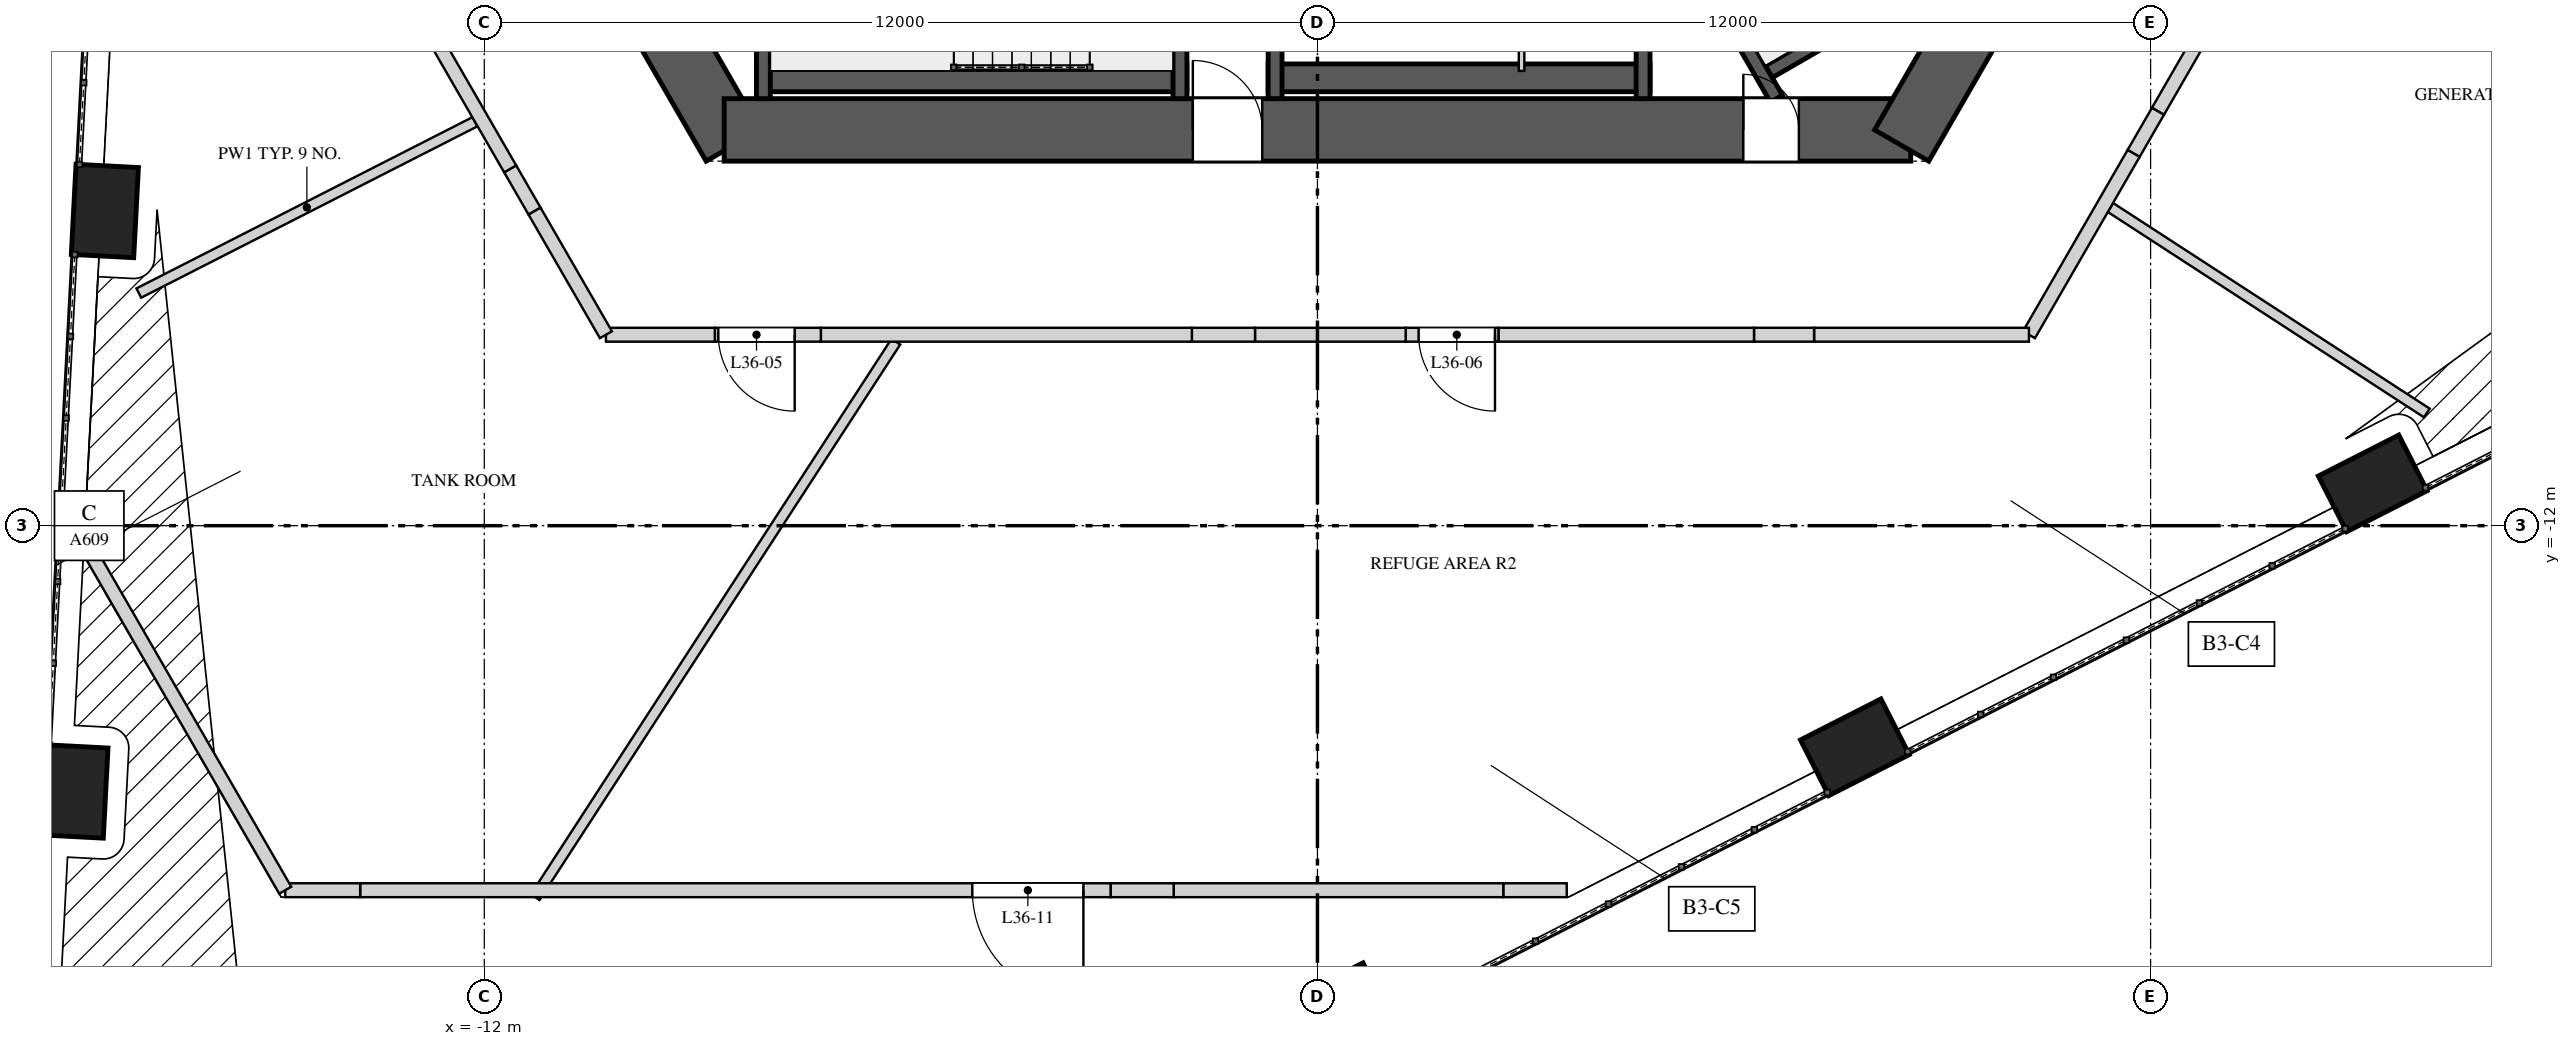
"""IFC4 building model, lengths in metres.
Left out: names, types, materials, properties, quantities, classifications, styles, units other than length and angle.
Written with IfcOpenShell. Run it as: python <this file> out.ifc"""

import sys

from ifc_helpers import new_model, si_unit, direction, frame, frame_2d, origin, origin_2d, place, context, subcontext, project, spatial, polyline, rectangle, outline, extrude, element, fill, save


model = new_model("IFC4")
c1 = context("Model", 3, precision=1e-05, world=origin(), true_north=direction((0.0, 1.0)))
c2 = subcontext(c1, "Body", "Model", "MODEL_VIEW")
j1 = project(units=[si_unit("LENGTHUNIT", "METRE"), si_unit("PLANEANGLEUNIT", "RADIAN")], contexts=[c1])
p1 = place(None, origin())
s1 = spatial("IfcSite", under=j1, at=p1, CompositionType="ELEMENT")
p2 = place(p1, origin())
s2 = spatial("IfcBuilding", under=s1, at=p2, CompositionType="ELEMENT")
p3 = place(p2, frame((0.0, 0.0, 157.6)))
s3 = spatial("IfcBuildingStorey", under=s2, at=p3, CompositionType="ELEMENT", Elevation=157.6)
p4 = place(p3, frame((-9.858, -4.025, 0.0), z_axis=(0.0, 0.0, 1.0), x_axis=(0.500059191753, -0.865991226713, 0.0)))
e1 = element("IfcWall", 1, at=p4, inside=s3, PredefinedType="SHEAR", context=c2, shape_type="SweptSolid", body=[
    extrude(rectangle(XDim=2.887, YDim=0.9, at=frame_2d((1.443, 0.0))), origin(), (0.0, 0.0, 1.0), 5.2),
])
p5 = place(p3, frame((-8.545, -6.3, 0.0), z_axis=(0.0, 0.0, 1.0), x_axis=(1.0, 0.0, 0.0)))
e2 = element("IfcWall", 2, at=p5, inside=s3, PredefinedType="SHEAR", context=c2, shape_type="SweptSolid", body=[
    extrude(rectangle(XDim=17.09, YDim=0.9, at=frame_2d((8.545, 0.0))), origin(), (0.0, 0.0, 1.0), 5.2),
])
p6 = place(p5, frame((6.75, 0.0, 0.0)))
e3 = element("IfcOpeningElement", 3, at=p6, cuts=e2, PredefinedType="OPENING", context=c2, shape_type="SweptSolid", body=[
    extrude(rectangle(XDim=1.0, YDim=2.4, at=frame_2d((0.5, 1.2))), frame((0.0, 0.46, 0.0), z_axis=(0.0, -1.0, 0.0), x_axis=(1.0, 0.0, 0.0)), (0.0, 0.0, 1.0), 0.92),
])
p7 = place(p5, frame((14.678, 0.0, 0.0)))
e4 = element("IfcOpeningElement", 4, at=p7, cuts=e2, PredefinedType="OPENING", context=c2, shape_type="SweptSolid", body=[
    extrude(rectangle(XDim=0.8, YDim=2.1, at=frame_2d((0.4, 1.05))), frame((0.0, 0.46, 0.0), z_axis=(0.0, -1.0, 0.0), x_axis=(1.0, 0.0, 0.0)), (0.0, 0.0, 1.0), 0.92),
])
p8 = place(p3, frame((8.415, -6.525, 0.0), z_axis=(0.0, 0.0, 1.0), x_axis=(0.500059191753, 0.865991226713, 0.0)))
e5 = element("IfcWall", 5, at=p8, inside=s3, PredefinedType="SHEAR", context=c2, shape_type="SweptSolid", body=[
    extrude(rectangle(XDim=2.887, YDim=0.9, at=frame_2d((1.443, 0.0))), origin(), (0.0, 0.0, 1.0), 5.2),
])
for number, where, z_axis, x_axis in (
    (6, (-17.465, -7.468, 0.0), (0.0, 0.0, 1.0), (-0.052, -0.999, 0.0)),
    (7, (-17.903, -15.828, 0.0), (0.0, 0.0, 1.0), (-0.052, -0.999, 0.0)),
    (8, (0.281, -18.992, 0.0), (0.0, 0.0, 1.0), (0.891, 0.454, 0.0)),
    (9, (7.74, -15.192, 0.0), (0.0, 0.0, 1.0), (0.891, 0.454, 0.0)),
    (10, (15.2, -11.391, 0.0), (0.0, 0.0, 1.0), (0.891, 0.454, 0.0)),
):
    element("IfcColumn", number, at=place(p3, frame(where, z_axis=z_axis, x_axis=x_axis)), inside=s3, PredefinedType="COLUMN", context=c2, shape_type="SweptSolid", body=[
        extrude(rectangle(XDim=1.3, YDim=0.9, at=origin_2d()), origin(), (0.0, 0.0, 1.0), 2.835),
    ])
p9 = place(p3, frame((-8.08, -5.55, 0.0), z_axis=(0.0, 0.0, 1.0), x_axis=(1.0, 0.0, 0.0)))
e11 = element("IfcWall", 11, at=p9, inside=s3, PredefinedType="SOLIDWALL", context=c2, shape_type="SweptSolid", body=[
    extrude(rectangle(XDim=6.2, YDim=0.4, at=frame_2d((3.1, 0.0))), origin(), (0.0, 0.0, 1.0), 4.85),
])
p10 = place(p3, frame((-7.98, -2.9, 0.0), z_axis=(0.0, 0.0, 1.0), x_axis=(0.0, -1.0, 0.0)))
e12 = element("IfcWall", 12, at=p10, inside=s3, PredefinedType="SOLIDWALL", context=c2, shape_type="SweptSolid", body=[
    extrude(rectangle(XDim=2.95, YDim=0.2, at=frame_2d((1.475, 0.0))), origin(), (0.0, 0.0, 1.0), 4.85),
])
p11 = place(p3, frame((-1.98, -2.9, 0.0), z_axis=(0.0, 0.0, 1.0), x_axis=(0.0, -1.0, 0.0)))
e13 = element("IfcWall", 13, at=p11, inside=s3, PredefinedType="SOLIDWALL", context=c2, shape_type="SweptSolid", body=[
    extrude(rectangle(XDim=2.95, YDim=0.2, at=frame_2d((1.475, 0.0))), origin(), (0.0, 0.0, 1.0), 4.85),
])
p12 = place(p11, frame((0.725, 0.0, 0.0)))
e14 = element("IfcOpeningElement", 14, at=p12, cuts=e13, PredefinedType="OPENING", context=c2, shape_type="SweptSolid", body=[
    extrude(rectangle(XDim=1.1, YDim=2.4, at=frame_2d((0.55, 1.2))), frame((0.0, 0.11, 0.0), z_axis=(0.0, -1.0, 0.0), x_axis=(1.0, 0.0, 0.0)), (0.0, 0.0, 1.0), 0.22),
])
p13 = place(p3, frame((6.611, -5.85, 0.0), z_axis=(0.0, 0.0, 1.0), x_axis=(-0.499965531574, 0.866045303225, 0.0)))
e15 = element("IfcWall", 15, at=p13, inside=s3, PredefinedType="SOLIDWALL", context=c2, shape_type="SweptSolid", body=[
    extrude(rectangle(XDim=6.492, YDim=0.2, at=frame_2d((3.246, 0.0))), origin(), (0.0, 0.0, 1.0), 4.85),
])
p14 = place(p3, frame((6.501, -5.461, 0.0), z_axis=(0.0, 0.0, 1.0), x_axis=(0.866003658127, 0.500037662692, 0.0)))
e16 = element("IfcWall", 16, at=p14, inside=s3, PredefinedType="SOLIDWALL", context=c2, shape_type="SweptSolid", body=[
    extrude(rectangle(XDim=2.95, YDim=0.2, at=frame_2d((1.475, 0.0))), origin(), (0.0, 0.0, 1.0), 4.85),
])
p15 = place(p3, frame((-0.71, -5.55, 0.0), z_axis=(0.0, 0.0, 1.0), x_axis=(1.0, 0.0, 0.0)))
e17 = element("IfcWall", 17, at=p15, inside=s3, PredefinedType="SOLIDWALL", context=c2, shape_type="SweptSolid", body=[
    extrude(rectangle(XDim=5.5, YDim=0.4, at=frame_2d((2.75, 0.0))), origin(), (0.0, 0.0, 1.0), 4.85),
])
for number, where, z_axis, x_axis in (
    (18, (-0.61, -3.1, 0.0), (0.0, 0.0, 1.0), (0.0, -1.0, 0.0)),
    (19, (4.69, -3.1, 0.0), (0.0, 0.0, 1.0), (0.0, -1.0, 0.0)),
):
    element("IfcWall", number, at=place(p3, frame(where, z_axis=z_axis, x_axis=x_axis)), inside=s3, PredefinedType="SOLIDWALL", context=c2, shape_type="SweptSolid", body=[
        extrude(rectangle(XDim=2.75, YDim=0.2, at=frame_2d((1.375, 0.0))), origin(), (0.0, 0.0, 1.0), 4.85),
    ])
p16 = place(p3, frame((2.94, -3.1, 0.0), z_axis=(0.0, 0.0, 1.0), x_axis=(0.0, -1.0, 0.0)))
e20 = element("IfcWall", 20, at=p16, inside=s3, PredefinedType="PARTITIONING", context=c2, shape_type="SweptSolid", body=[
    extrude(rectangle(XDim=2.35, YDim=0.08, at=frame_2d((1.175, 0.0))), origin(), (0.0, 0.0, 1.0), 4.85),
])
p17 = place(p3, frame((-12.134, -6.183, 0.0), z_axis=(0.0, 0.0, 1.0), x_axis=(-0.891023038557, -0.45395808701, 0.0)))
e21 = element("IfcWall", 21, at=p17, inside=s3, PredefinedType="PARTITIONING", context=c2, shape_type="SweptSolid", body=[
    extrude(rectangle(XDim=5.434, YDim=0.15, at=frame_2d((2.717, 0.0))), origin(), (0.0, 0.0, 1.0), 4.85),
])
p18 = place(p3, frame((-6.072, -9.35, 0.0), z_axis=(0.0, 0.0, 1.0), x_axis=(-0.544642851203, -0.838668089672, 0.0)))
e22 = element("IfcWall", 22, at=p18, inside=s3, PredefinedType="PARTITIONING", context=c2, shape_type="SweptSolid", body=[
    extrude(rectangle(XDim=9.539, YDim=0.15, at=frame_2d((4.77, 0.0))), origin(), (0.0, 0.0, 1.0), 4.85),
])
p19 = place(p3, frame((11.422, -7.417, 0.0), z_axis=(0.0, 0.0, 1.0), x_axis=(0.838667328076, -0.544644023944, 0.0)))
e23 = element("IfcWall", 23, at=p19, inside=s3, PredefinedType="PARTITIONING", context=c2, shape_type="SweptSolid", body=[
    extrude(rectangle(XDim=5.434, YDim=0.15, at=frame_2d((2.717, 0.0))), origin(), (0.0, 0.0, 1.0), 4.85),
])
p20 = place(p3, frame((13.135, -4.25, 0.0), z_axis=(0.0, 0.0, 1.0), x_axis=(-0.500030520673, -0.866007781949, 0.0)))
e24 = element("IfcWall", 24, at=p20, inside=s3, PredefinedType="SOLIDWALL", context=c2, shape_type="SweptSolid", body=[
    extrude(rectangle(XDim=2.058, YDim=0.2, at=frame_2d((1.029, 0.0))), origin(), (0.0, 0.0, 1.0), 4.85),
])
p21 = place(p3, frame((12.106, -6.032, 0.0), z_axis=(0.0, 0.0, 1.0), x_axis=(-0.49996389635, -0.866046247233, 0.0)))
e25 = element("IfcWall", 25, at=p21, inside=s3, PredefinedType="SOLIDWALL", context=c2, shape_type="SweptSolid", body=[
    extrude(rectangle(XDim=0.7, YDim=0.2, at=frame_2d((0.35, 0.0))), origin(), (0.0, 0.0, 1.0), 4.15),
])
p22 = place(p3, frame((11.756, -6.639, 0.0), z_axis=(0.0, 0.0, 1.0), x_axis=(-0.499979445284, -0.86603727073, 0.0)))
e26 = element("IfcWall", 26, at=p22, inside=s3, PredefinedType="SOLIDWALL", context=c2, shape_type="SweptSolid", body=[
    extrude(rectangle(XDim=3.015, YDim=0.2, at=frame_2d((1.508, 0.0))), origin(), (0.0, 0.0, 1.0), 4.85),
])
p23 = place(p3, frame((10.248, -9.25, 0.0), z_axis=(0.0, 0.0, 1.0), x_axis=(-1.0, 0.0, 0.0)))
e27 = element("IfcWall", 27, at=p23, inside=s3, PredefinedType="SOLIDWALL", context=c2, shape_type="SweptSolid", body=[
    extrude(rectangle(XDim=3.095, YDim=0.2, at=frame_2d((1.547, 0.0))), origin(), (0.0, 0.0, 1.0), 4.85),
])
p24 = place(p3, frame((7.153, -9.25, 0.0), z_axis=(0.0, 0.0, 1.0), x_axis=(-1.0, 0.0, 0.0)))
e28 = element("IfcWall", 28, at=p24, inside=s3, PredefinedType="SOLIDWALL", context=c2, shape_type="SweptSolid", body=[
    extrude(rectangle(XDim=0.865, YDim=0.2, at=frame_2d((0.433, 0.0))), origin(), (0.0, 0.0, 1.0), 4.15),
])
p25 = place(p3, frame((6.288, -9.25, 0.0), z_axis=(0.0, 0.0, 1.0), x_axis=(-1.0, 0.0, 0.0)))
e29 = element("IfcWall", 29, at=p25, inside=s3, PredefinedType="SOLIDWALL", context=c2, shape_type="SweptSolid", body=[
    extrude(rectangle(XDim=3.681, YDim=0.2, at=frame_2d((1.84, 0.0))), origin(), (0.0, 0.0, 1.0), 4.85),
])
p26 = place(p3, frame((2.607, -9.25, 0.0), z_axis=(0.0, 0.0, 1.0), x_axis=(-1.0, 0.0, 0.0)))
e30 = element("IfcWall", 30, at=p26, inside=s3, PredefinedType="SOLIDWALL", context=c2, shape_type="SweptSolid", body=[
    extrude(outline(polyline([(0.0, 0.0), (1.337, 0.0), (1.337, 4.15), (0.626, 4.15), (0.626, 4.85), (0.0, 4.85), (0.0, 0.0)])), frame((0.0, 0.1, 0.0), z_axis=(0.0, -1.0, 0.0), x_axis=(1.0, 0.0, 0.0)), (0.0, 0.0, 1.0), 0.2),
])
p27 = place(p26, frame((0.05, 0.0, 0.0)))
e31 = element("IfcOpeningElement", 31, at=p27, cuts=e30, PredefinedType="OPENING", context=c2, shape_type="SweptSolid", body=[
    extrude(rectangle(XDim=1.1, YDim=2.2, at=frame_2d((0.55, 1.1))), frame((0.0, 0.11, 0.0), z_axis=(0.0, -1.0, 0.0), x_axis=(1.0, 0.0, 0.0)), (0.0, 0.0, 1.0), 0.22),
])
p28 = place(p3, frame((1.271, -9.25, 0.0), z_axis=(0.0, 0.0, 1.0), x_axis=(-1.0, 0.0, 0.0)))
e32 = element("IfcWall", 32, at=p28, inside=s3, PredefinedType="SOLIDWALL", context=c2, shape_type="SweptSolid", body=[
    extrude(rectangle(XDim=2.17, YDim=0.2, at=frame_2d((1.085, 0.0))), origin(), (0.0, 0.0, 1.0), 4.85),
])
p29 = place(p3, frame((-0.899, -9.25, 0.0), z_axis=(0.0, 0.0, 1.0), x_axis=(-1.0, 0.0, 0.0)))
e33 = element("IfcWall", 33, at=p29, inside=s3, PredefinedType="SOLIDWALL", context=c2, shape_type="SweptSolid", body=[
    extrude(rectangle(XDim=0.909, YDim=0.2, at=frame_2d((0.455, 0.0))), origin(), (0.0, 0.0, 1.0), 3.75),
])
p30 = place(p3, frame((-1.809, -9.25, 0.0), z_axis=(0.0, 0.0, 1.0), x_axis=(-1.0, 0.0, 0.0)))
e34 = element("IfcWall", 34, at=p30, inside=s3, PredefinedType="SOLIDWALL", context=c2, shape_type="SweptSolid", body=[
    extrude(rectangle(XDim=5.344, YDim=0.2, at=frame_2d((2.672, 0.0))), origin(), (0.0, 0.0, 1.0), 4.85),
])
p31 = place(p3, frame((-7.152, -9.25, 0.0), z_axis=(0.0, 0.0, 1.0), x_axis=(-1.0, 0.0, 0.0)))
e35 = element("IfcWall", 35, at=p31, inside=s3, PredefinedType="SOLIDWALL", context=c2, shape_type="SweptSolid", body=[
    extrude(outline(polyline([(0.0, 0.0), (1.527, 0.0), (1.527, 4.85), (1.039, 4.85), (1.039, 3.95), (0.0, 3.95), (0.0, 0.0)])), frame((0.0, 0.1, 0.0), z_axis=(0.0, -1.0, 0.0), x_axis=(1.0, 0.0, 0.0)), (0.0, 0.0, 1.0), 0.2),
])
p32 = place(p31, frame((0.377, 0.0, 0.0)))
e36 = element("IfcOpeningElement", 36, at=p32, cuts=e35, PredefinedType="OPENING", context=c2, shape_type="SweptSolid", body=[
    extrude(rectangle(XDim=1.1, YDim=2.2, at=frame_2d((0.55, 1.1))), frame((0.0, 0.11, 0.0), z_axis=(0.0, -1.0, 0.0), x_axis=(1.0, 0.0, 0.0)), (0.0, 0.0, 1.0), 0.22),
])
p33 = place(p3, frame((-8.679, -9.25, 0.0), z_axis=(0.0, 0.0, 1.0), x_axis=(-1.0, 0.0, 0.0)))
e37 = element("IfcWall", 37, at=p33, inside=s3, PredefinedType="SOLIDWALL", context=c2, shape_type="SweptSolid", body=[
    extrude(rectangle(XDim=1.569, YDim=0.2, at=frame_2d((0.784, 0.0))), origin(), (0.0, 0.0, 1.0), 4.85),
])
p34 = place(p3, frame((-10.248, -9.25, 0.0), z_axis=(0.0, 0.0, 1.0), x_axis=(-0.499941542975, 0.866059151333, 0.0)))
e38 = element("IfcWall", 38, at=p34, inside=s3, PredefinedType="SOLIDWALL", context=c2, shape_type="SweptSolid", body=[
    extrude(rectangle(XDim=2.058, YDim=0.2, at=frame_2d((1.029, 0.0))), origin(), (0.0, 0.0, 1.0), 4.85),
])
p35 = place(p3, frame((-11.277, -7.468, 0.0), z_axis=(0.0, 0.0, 1.0), x_axis=(-0.50022532796, 0.865895271535, 0.0)))
e39 = element("IfcWall", 39, at=p35, inside=s3, PredefinedType="SOLIDWALL", context=c2, shape_type="SweptSolid", body=[
    extrude(rectangle(XDim=0.7, YDim=0.2, at=frame_2d((0.35, 0.0))), origin(), (0.0, 0.0, 1.0), 4.15),
])
p36 = place(p3, frame((-11.627, -6.861, 0.0), z_axis=(0.0, 0.0, 1.0), x_axis=(-0.499979445284, 0.86603727073, 0.0)))
e40 = element("IfcWall", 40, at=p36, inside=s3, PredefinedType="SOLIDWALL", context=c2, shape_type="SweptSolid", body=[
    extrude(rectangle(XDim=3.015, YDim=0.2, at=frame_2d((1.508, 0.0))), origin(), (0.0, 0.0, 1.0), 4.85),
])
p37 = place(p3, frame((3.591, -17.25, 0.0), z_axis=(0.0, 0.0, 1.0), x_axis=(-1.0, 0.0, 0.0)))
e41 = element("IfcWall", 41, at=p37, inside=s3, PredefinedType="SOLIDWALL", context=c2, shape_type="SweptSolid", body=[
    extrude(rectangle(XDim=0.914, YDim=0.2, at=frame_2d((0.457, 0.0))), origin(), (0.0, 0.0, 1.0), 4.15),
])
p38 = place(p3, frame((2.677, -17.25, 0.0), z_axis=(0.0, 0.0, 1.0), x_axis=(-1.0, 0.0, 0.0)))
e42 = element("IfcWall", 42, at=p38, inside=s3, PredefinedType="SOLIDWALL", context=c2, shape_type="SweptSolid", body=[
    extrude(rectangle(XDim=4.747, YDim=0.2, at=frame_2d((2.374, 0.0))), origin(), (0.0, 0.0, 1.0), 4.85),
])
p39 = place(p3, frame((-2.07, -17.25, 0.0), z_axis=(0.0, 0.0, 1.0), x_axis=(-1.0, 0.0, 0.0)))
e43 = element("IfcWall", 43, at=p39, inside=s3, PredefinedType="SOLIDWALL", context=c2, shape_type="SweptSolid", body=[
    extrude(rectangle(XDim=0.91, YDim=0.2, at=frame_2d((0.455, 0.0))), origin(), (0.0, 0.0, 1.0), 3.75),
])
p40 = place(p3, frame((-2.98, -17.25, 0.0), z_axis=(0.0, 0.0, 1.0), x_axis=(-1.0, 0.0, 0.0)))
e44 = element("IfcWall", 44, at=p40, inside=s3, PredefinedType="SOLIDWALL", context=c2, shape_type="SweptSolid", body=[
    extrude(rectangle(XDim=10.808, YDim=0.2, at=frame_2d((5.404, 0.0))), origin(), (0.0, 0.0, 1.0), 4.85),
])
p41 = place(p40, frame((0.391, 0.0, 0.0)))
e45 = element("IfcOpeningElement", 45, at=p41, cuts=e44, PredefinedType="OPENING", context=c2, shape_type="SweptSolid", body=[
    extrude(rectangle(XDim=1.6, YDim=2.3, at=frame_2d((0.8, 1.15))), frame((0.0, 0.11, 0.0), z_axis=(0.0, -1.0, 0.0), x_axis=(1.0, 0.0, 0.0)), (0.0, 0.0, 1.0), 0.22),
])
p42 = place(p3, frame((-13.788, -17.25, 0.0), z_axis=(0.0, 0.0, 1.0), x_axis=(-1.0, 0.0, 0.0)))
e46 = element("IfcWall", 46, at=p42, inside=s3, PredefinedType="SOLIDWALL", context=c2, shape_type="SweptSolid", body=[
    extrude(rectangle(XDim=1.079, YDim=0.2, at=frame_2d((0.54, 0.0))), origin(), (0.0, 0.0, 1.0), 3.95),
])
p43 = place(p3, frame((-14.867, -17.25, 0.0), z_axis=(0.0, 0.0, 1.0), x_axis=(-0.500008664361, 0.866020401355, 0.0)))
e47 = element("IfcWall", 47, at=p43, inside=s3, PredefinedType="SOLIDWALL", context=c2, shape_type="SweptSolid", body=[
    extrude(rectangle(XDim=5.612, YDim=0.2, at=frame_2d((2.806, 0.0))), origin(), (0.0, 0.0, 1.0), 4.85),
])
p44 = place(p6, origin())
e48 = element("IfcDoor", 48, at=p44, inside=s3, OperationType="SINGLE_SWING_LEFT", PredefinedType="DOOR", context=c2, shape_type="SweptSolid", body=[
    extrude(rectangle(XDim=1.0, YDim=2.4, at=frame_2d((0.5, 1.2))), frame((0.0, 0.025, 0.0), z_axis=(0.0, -1.0, 0.0), x_axis=(1.0, 0.0, 0.0)), (0.0, 0.0, 1.0), 0.05),
])
fill(e3, e48)
p45 = place(p7, origin())
e49 = element("IfcDoor", 49, at=p45, inside=s3, OperationType="SINGLE_SWING_LEFT", PredefinedType="DOOR", context=c2, shape_type="SweptSolid", body=[
    extrude(rectangle(XDim=0.8, YDim=2.1, at=frame_2d((0.4, 1.05))), frame((0.0, 0.025, 0.0), z_axis=(0.0, -1.0, 0.0), x_axis=(1.0, 0.0, 0.0)), (0.0, 0.0, 1.0), 0.05),
])
fill(e4, e49)
p46 = place(p32, origin())
e50 = element("IfcDoor", 50, at=p46, inside=s3, OperationType="SINGLE_SWING_LEFT", PredefinedType="DOOR", context=c2, shape_type="SweptSolid", body=[
    extrude(rectangle(XDim=1.1, YDim=2.2, at=frame_2d((0.55, 1.1))), frame((0.0, 0.025, 0.0), z_axis=(0.0, -1.0, 0.0), x_axis=(1.0, 0.0, 0.0)), (0.0, 0.0, 1.0), 0.05),
])
fill(e36, e50)
p47 = place(p27, origin())
e51 = element("IfcDoor", 51, at=p47, inside=s3, OperationType="SINGLE_SWING_RIGHT", PredefinedType="DOOR", context=c2, shape_type="SweptSolid", body=[
    extrude(rectangle(XDim=1.1, YDim=2.2, at=frame_2d((0.55, 1.1))), frame((0.0, 0.025, 0.0), z_axis=(0.0, -1.0, 0.0), x_axis=(1.0, 0.0, 0.0)), (0.0, 0.0, 1.0), 0.05),
])
fill(e31, e51)
p48 = place(p41, origin())
e52 = element("IfcDoor", 52, at=p48, inside=s3, OperationType="DOUBLE_DOOR_SINGLE_SWING", PredefinedType="DOOR", context=c2, shape_type="SweptSolid", body=[
    extrude(rectangle(XDim=1.6, YDim=2.3, at=frame_2d((0.8, 1.15))), frame((0.0, 0.025, 0.0), z_axis=(0.0, -1.0, 0.0), x_axis=(1.0, 0.0, 0.0)), (0.0, 0.0, 1.0), 0.05),
])
fill(e45, e52)
save(model, sys.argv[1])
